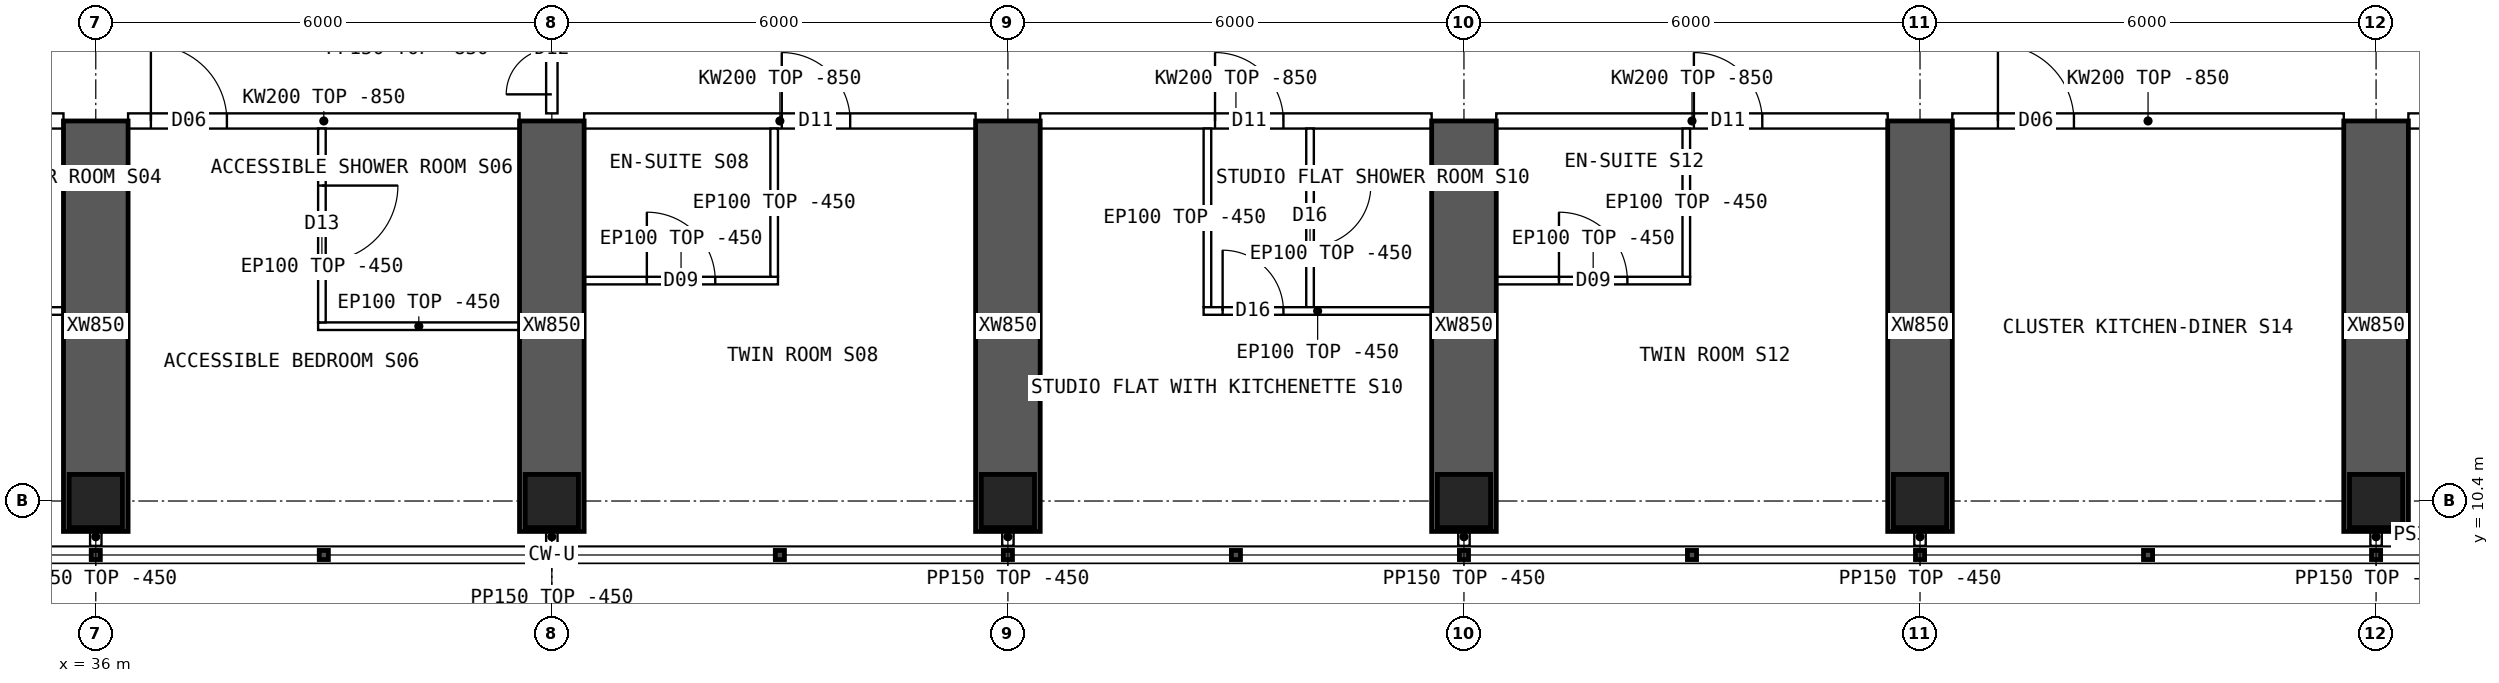
"""IFC4 building model, lengths in metres.
Left out: names, types, materials, properties, quantities, classifications, styles, units other than length and angle.
Written with IfcOpenShell. Run it as: python <this file> out.ifc"""

import sys

from ifc_helpers import new_model, si_unit, direction, frame, frame_2d, origin, origin_2d, place, context, subcontext, project, spatial, polyline, rectangle, hollow_rectangle, outline, extrude, element, fill, save


model = new_model("IFC4")
c1 = context("Model", 3, precision=1e-05, world=origin(), true_north=direction((0.0, 1.0)))
c2 = subcontext(c1, "Body", "Model", "MODEL_VIEW")
j1 = project(units=[si_unit("LENGTHUNIT", "METRE"), si_unit("PLANEANGLEUNIT", "RADIAN")], contexts=[c1])
p1 = place(None, origin())
s1 = spatial("IfcSite", under=j1, at=p1, CompositionType="ELEMENT")
p2 = place(p1, origin())
s2 = spatial("IfcBuilding", under=s1, at=p2, CompositionType="ELEMENT")
p3 = place(p2, frame((0.0, 0.0, 159.85)))
s3 = spatial("IfcBuildingStorey", under=s2, at=p3, CompositionType="ELEMENT", Elevation=159.85)
for number, where, z_axis, x_axis in (
    (1, (36.0, 10.4, 0.0), (0.0, 0.0, 1.0), (1.0, 0.0, 0.0)),
    (2, (42.0, 10.4, 0.0), (0.0, 0.0, 1.0), (1.0, 0.0, 0.0)),
    (3, (48.0, 10.4, 0.0), (0.0, 0.0, 1.0), (1.0, 0.0, 0.0)),
    (4, (54.0, 10.4, 0.0), (0.0, 0.0, 1.0), (1.0, 0.0, 0.0)),
    (5, (60.0, 10.4, 0.0), (0.0, 0.0, 1.0), (1.0, 0.0, 0.0)),
    (6, (66.0, 10.4, 0.0), (0.0, 0.0, 1.0), (1.0, 0.0, 0.0)),
):
    element("IfcColumn", number, at=place(p3, frame(where, z_axis=z_axis, x_axis=x_axis)), inside=s3, PredefinedType="COLUMN", context=c2, shape_type="SweptSolid", body=[
        extrude(hollow_rectangle(XDim=0.7, YDim=0.7, WallThickness=0.07, at=origin_2d()), origin(), (0.0, 0.0, 1.0), 3.75),
    ])
for number, where, z_axis, x_axis in (
    (7, (36.0, 10.0, 0.0), (0.0, 0.0, 1.0), (0.0, 1.0, 0.0)),
    (8, (42.0, 10.0, 0.0), (0.0, 0.0, 1.0), (0.0, 1.0, 0.0)),
    (9, (48.0, 10.0, 0.0), (0.0, 0.0, 1.0), (0.0, 1.0, 0.0)),
    (10, (54.0, 10.0, 0.0), (0.0, 0.0, 1.0), (0.0, 1.0, 0.0)),
    (11, (60.0, 10.0, 0.0), (0.0, 0.0, 1.0), (0.0, 1.0, 0.0)),
    (12, (66.0, 10.0, 0.0), (0.0, 0.0, 1.0), (0.0, 1.0, 0.0)),
):
    element("IfcWall", number, at=place(p3, frame(where, z_axis=z_axis, x_axis=x_axis)), inside=s3, PredefinedType="SHEAR", context=c2, shape_type="SweptSolid", body=[
        extrude(rectangle(XDim=5.4, YDim=0.85, at=frame_2d((2.7, 0.0))), origin(), (0.0, 0.0, 1.0), 3.75),
    ])
p4 = place(p3, frame((66.8, 9.95, 0.0), z_axis=(0.0, 0.0, 1.0), x_axis=(-1.0, 0.0, 0.0)))
e13 = element("IfcWall", 13, at=p4, inside=s3, PredefinedType="SOLIDWALL", context=c2, shape_type="SweptSolid", body=[
    extrude(rectangle(XDim=0.375, YDim=0.3, at=frame_2d((0.188, 0.0))), origin(), (0.0, 0.0, 1.0), 3.3),
])
p5 = place(p3, frame((30.425, 15.4, 0.0), z_axis=(0.0, 0.0, 1.0), x_axis=(1.0, 0.0, 0.0)))
e14 = element("IfcWall", 14, at=p5, inside=s3, PredefinedType="SOLIDWALL", context=c2, shape_type="SweptSolid", body=[
    extrude(outline(polyline([(0.0, 0.0), (5.15, 0.0), (5.15, 2.9), (0.0, 2.9), (0.0, 0.0)])), frame((0.0, 0.1, 0.0), z_axis=(0.0, -1.0, 0.0), x_axis=(1.0, 0.0, 0.0)), (0.0, 0.0, 1.0), 0.2),
])
p6 = place(p5, frame((2.3, 0.0, 0.0)))
e15 = element("IfcOpeningElement", 15, at=p6, cuts=e14, PredefinedType="OPENING", context=c2, shape_type="SweptSolid", body=[
    extrude(rectangle(XDim=0.9, YDim=2.1, at=frame_2d((0.45, 1.05))), frame((0.0, 0.11, 0.0), z_axis=(0.0, -1.0, 0.0), x_axis=(1.0, 0.0, 0.0)), (0.0, 0.0, 1.0), 0.22),
])
p7 = place(p3, frame((36.425, 15.4, 0.0), z_axis=(0.0, 0.0, 1.0), x_axis=(1.0, 0.0, 0.0)))
e16 = element("IfcWall", 16, at=p7, inside=s3, PredefinedType="SOLIDWALL", context=c2, shape_type="SweptSolid", body=[
    extrude(outline(polyline([(0.0, 0.0), (5.15, 0.0), (5.15, 2.9), (0.0, 2.9), (0.0, 0.0)])), frame((0.0, 0.1, 0.0), z_axis=(0.0, -1.0, 0.0), x_axis=(1.0, 0.0, 0.0)), (0.0, 0.0, 1.0), 0.2),
])
p8 = place(p7, frame((0.3, 0.0, 0.0)))
e17 = element("IfcOpeningElement", 17, at=p8, cuts=e16, PredefinedType="OPENING", context=c2, shape_type="SweptSolid", body=[
    extrude(rectangle(XDim=1.0, YDim=2.1, at=frame_2d((0.5, 1.05))), frame((0.0, 0.11, 0.0), z_axis=(0.0, -1.0, 0.0), x_axis=(1.0, 0.0, 0.0)), (0.0, 0.0, 1.0), 0.22),
])
p9 = place(p3, frame((42.425, 15.4, 0.0), z_axis=(0.0, 0.0, 1.0), x_axis=(1.0, 0.0, 0.0)))
e18 = element("IfcWall", 18, at=p9, inside=s3, PredefinedType="SOLIDWALL", context=c2, shape_type="SweptSolid", body=[
    extrude(outline(polyline([(0.0, 0.0), (5.15, 0.0), (5.15, 2.9), (0.0, 2.9), (0.0, 0.0)])), frame((0.0, 0.1, 0.0), z_axis=(0.0, -1.0, 0.0), x_axis=(1.0, 0.0, 0.0)), (0.0, 0.0, 1.0), 0.2),
])
p10 = place(p9, frame((2.6, 0.0, 0.0)))
e19 = element("IfcOpeningElement", 19, at=p10, cuts=e18, PredefinedType="OPENING", context=c2, shape_type="SweptSolid", body=[
    extrude(rectangle(XDim=0.9, YDim=2.1, at=frame_2d((0.45, 1.05))), frame((0.0, 0.11, 0.0), z_axis=(0.0, -1.0, 0.0), x_axis=(1.0, 0.0, 0.0)), (0.0, 0.0, 1.0), 0.22),
])
p11 = place(p3, frame((48.425, 15.4, 0.0), z_axis=(0.0, 0.0, 1.0), x_axis=(1.0, 0.0, 0.0)))
e20 = element("IfcWall", 20, at=p11, inside=s3, PredefinedType="SOLIDWALL", context=c2, shape_type="SweptSolid", body=[
    extrude(outline(polyline([(0.0, 0.0), (5.15, 0.0), (5.15, 2.9), (0.0, 2.9), (0.0, 0.0)])), frame((0.0, 0.1, 0.0), z_axis=(0.0, -1.0, 0.0), x_axis=(1.0, 0.0, 0.0)), (0.0, 0.0, 1.0), 0.2),
])
p12 = place(p11, frame((2.3, 0.0, 0.0)))
e21 = element("IfcOpeningElement", 21, at=p12, cuts=e20, PredefinedType="OPENING", context=c2, shape_type="SweptSolid", body=[
    extrude(rectangle(XDim=0.9, YDim=2.1, at=frame_2d((0.45, 1.05))), frame((0.0, 0.11, 0.0), z_axis=(0.0, -1.0, 0.0), x_axis=(1.0, 0.0, 0.0)), (0.0, 0.0, 1.0), 0.22),
])
p13 = place(p3, frame((54.425, 15.4, 0.0), z_axis=(0.0, 0.0, 1.0), x_axis=(1.0, 0.0, 0.0)))
e22 = element("IfcWall", 22, at=p13, inside=s3, PredefinedType="SOLIDWALL", context=c2, shape_type="SweptSolid", body=[
    extrude(outline(polyline([(0.0, 0.0), (5.15, 0.0), (5.15, 2.9), (0.0, 2.9), (0.0, 0.0)])), frame((0.0, 0.1, 0.0), z_axis=(0.0, -1.0, 0.0), x_axis=(1.0, 0.0, 0.0)), (0.0, 0.0, 1.0), 0.2),
])
p14 = place(p13, frame((2.6, 0.0, 0.0)))
e23 = element("IfcOpeningElement", 23, at=p14, cuts=e22, PredefinedType="OPENING", context=c2, shape_type="SweptSolid", body=[
    extrude(rectangle(XDim=0.9, YDim=2.1, at=frame_2d((0.45, 1.05))), frame((0.0, 0.11, 0.0), z_axis=(0.0, -1.0, 0.0), x_axis=(1.0, 0.0, 0.0)), (0.0, 0.0, 1.0), 0.22),
])
p15 = place(p3, frame((60.425, 15.4, 0.0), z_axis=(0.0, 0.0, 1.0), x_axis=(1.0, 0.0, 0.0)))
e24 = element("IfcWall", 24, at=p15, inside=s3, PredefinedType="SOLIDWALL", context=c2, shape_type="SweptSolid", body=[
    extrude(outline(polyline([(0.0, 0.0), (5.15, 0.0), (5.15, 2.9), (0.0, 2.9), (0.0, 0.0)])), frame((0.0, 0.1, 0.0), z_axis=(0.0, -1.0, 0.0), x_axis=(1.0, 0.0, 0.0)), (0.0, 0.0, 1.0), 0.2),
])
p16 = place(p15, frame((0.6, 0.0, 0.0)))
e25 = element("IfcOpeningElement", 25, at=p16, cuts=e24, PredefinedType="OPENING", context=c2, shape_type="SweptSolid", body=[
    extrude(rectangle(XDim=1.0, YDim=2.1, at=frame_2d((0.5, 1.05))), frame((0.0, 0.11, 0.0), z_axis=(0.0, -1.0, 0.0), x_axis=(1.0, 0.0, 0.0)), (0.0, 0.0, 1.0), 0.22),
])
p17 = place(p3, frame((66.425, 15.4, 0.0), z_axis=(0.0, 0.0, 1.0), x_axis=(1.0, 0.0, 0.0)))
e26 = element("IfcWall", 26, at=p17, inside=s3, PredefinedType="SOLIDWALL", context=c2, shape_type="SweptSolid", body=[
    extrude(rectangle(XDim=1.975, YDim=0.2, at=frame_2d((0.987, 0.0))), origin(), (0.0, 0.0, 1.0), 3.3),
])
p18 = place(p17, frame((0.2, 0.0, 0.0)))
e27 = element("IfcOpeningElement", 27, at=p18, cuts=e26, PredefinedType="OPENING", context=c2, shape_type="SweptSolid", body=[
    extrude(rectangle(XDim=0.9, YDim=2.1, at=frame_2d((0.45, 1.05))), frame((0.0, 0.11, 0.0), z_axis=(0.0, -1.0, 0.0), x_axis=(1.0, 0.0, 0.0)), (0.0, 0.0, 1.0), 0.22),
])
p19 = place(p3, frame((35.575, 12.9, 0.0), z_axis=(0.0, 0.0, 1.0), x_axis=(-1.0, 0.0, 0.0)))
e28 = element("IfcWall", 28, at=p19, inside=s3, PredefinedType="PARTITIONING", context=c2, shape_type="SweptSolid", body=[
    extrude(rectangle(XDim=3.0, YDim=0.1, at=frame_2d((1.5, 0.0))), origin(), (0.0, 0.0, 1.0), 3.3),
])
p20 = place(p19, frame((1.95, 0.0, 0.0)))
e29 = element("IfcOpeningElement", 29, at=p20, cuts=e28, PredefinedType="OPENING", context=c2, shape_type="SweptSolid", body=[
    extrude(rectangle(XDim=0.8, YDim=2.1, at=frame_2d((0.4, 1.05))), frame((0.0, 0.06, 0.0), z_axis=(0.0, -1.0, 0.0), x_axis=(1.0, 0.0, 0.0)), (0.0, 0.0, 1.0), 0.12),
])
p21 = place(p3, frame((38.925, 12.7, 0.0), z_axis=(0.0, 0.0, 1.0), x_axis=(1.0, 0.0, 0.0)))
e30 = element("IfcWall", 30, at=p21, inside=s3, PredefinedType="PARTITIONING", context=c2, shape_type="SweptSolid", body=[
    extrude(rectangle(XDim=2.65, YDim=0.1, at=frame_2d((1.325, 0.0))), origin(), (0.0, 0.0, 1.0), 3.3),
])
p22 = place(p3, frame((38.975, 12.75, 0.0), z_axis=(0.0, 0.0, 1.0), x_axis=(0.0, 1.0, 0.0)))
e31 = element("IfcWall", 31, at=p22, inside=s3, PredefinedType="PARTITIONING", context=c2, shape_type="SweptSolid", body=[
    extrude(outline(polyline([(0.0, 0.0), (2.55, 0.0), (2.55, 2.9), (2.502, 2.9), (2.5, 3.3), (0.0, 3.3), (0.0, 0.0)])), frame((0.0, 0.05, 0.0), z_axis=(0.0, -1.0, 0.0), x_axis=(1.0, 0.0, 0.0)), (0.0, 0.0, 1.0), 0.1),
])
p23 = place(p22, frame((0.8, 0.0, 0.0)))
e32 = element("IfcOpeningElement", 32, at=p23, cuts=e31, PredefinedType="OPENING", context=c2, shape_type="SweptSolid", body=[
    extrude(rectangle(XDim=1.0, YDim=2.1, at=frame_2d((0.5, 1.05))), frame((0.0, 0.06, 0.0), z_axis=(0.0, -1.0, 0.0), x_axis=(1.0, 0.0, 0.0)), (0.0, 0.0, 1.0), 0.12),
])
p24 = place(p3, frame((44.975, 13.3, 0.0), z_axis=(0.0, 0.0, 1.0), x_axis=(-1.0, 0.0, 0.0)))
e33 = element("IfcWall", 33, at=p24, inside=s3, PredefinedType="PARTITIONING", context=c2, shape_type="SweptSolid", body=[
    extrude(rectangle(XDim=2.55, YDim=0.1, at=frame_2d((1.275, 0.0))), origin(), (0.0, 0.0, 1.0), 3.3),
])
p25 = place(p24, frame((0.825, 0.0, 0.0)))
e34 = element("IfcOpeningElement", 34, at=p25, cuts=e33, PredefinedType="OPENING", context=c2, shape_type="SweptSolid", body=[
    extrude(rectangle(XDim=0.9, YDim=2.1, at=frame_2d((0.45, 1.05))), frame((0.0, 0.06, 0.0), z_axis=(0.0, -1.0, 0.0), x_axis=(1.0, 0.0, 0.0)), (0.0, 0.0, 1.0), 0.12),
])
p26 = place(p3, frame((44.925, 13.35, 0.0), z_axis=(0.0, 0.0, 1.0), x_axis=(0.0, 1.0, 0.0)))
e35 = element("IfcWall", 35, at=p26, inside=s3, PredefinedType="PARTITIONING", context=c2, shape_type="SweptSolid", body=[
    extrude(outline(polyline([(0.0, 0.0), (1.95, 0.0), (1.95, 2.9), (1.902, 2.9), (1.9, 3.3), (0.0, 3.3), (0.0, 0.0)])), frame((0.0, 0.05, 0.0), z_axis=(0.0, -1.0, 0.0), x_axis=(1.0, 0.0, 0.0)), (0.0, 0.0, 1.0), 0.1),
])
p27 = place(p3, frame((53.575, 12.9, 0.0), z_axis=(0.0, 0.0, 1.0), x_axis=(-1.0, 0.0, 0.0)))
e36 = element("IfcWall", 36, at=p27, inside=s3, PredefinedType="PARTITIONING", context=c2, shape_type="SweptSolid", body=[
    extrude(rectangle(XDim=3.0, YDim=0.1, at=frame_2d((1.5, 0.0))), origin(), (0.0, 0.0, 1.0), 3.3),
])
p28 = place(p27, frame((1.95, 0.0, 0.0)))
e37 = element("IfcOpeningElement", 37, at=p28, cuts=e36, PredefinedType="OPENING", context=c2, shape_type="SweptSolid", body=[
    extrude(rectangle(XDim=0.8, YDim=2.1, at=frame_2d((0.4, 1.05))), frame((0.0, 0.06, 0.0), z_axis=(0.0, -1.0, 0.0), x_axis=(1.0, 0.0, 0.0)), (0.0, 0.0, 1.0), 0.12),
])
p29 = place(p3, frame((50.625, 12.95, 0.0), z_axis=(0.0, 0.0, 1.0), x_axis=(0.0, 1.0, 0.0)))
e38 = element("IfcWall", 38, at=p29, inside=s3, PredefinedType="PARTITIONING", context=c2, shape_type="SweptSolid", body=[
    extrude(outline(polyline([(0.0, 0.0), (2.35, 0.0), (2.35, 2.9), (2.302, 2.9), (2.3, 3.3), (0.0, 3.3), (0.0, 0.0)])), frame((0.0, 0.05, 0.0), z_axis=(0.0, -1.0, 0.0), x_axis=(1.0, 0.0, 0.0)), (0.0, 0.0, 1.0), 0.1),
])
p30 = place(p3, frame((51.975, 12.95, 0.0), z_axis=(0.0, 0.0, 1.0), x_axis=(0.0, 1.0, 0.0)))
e39 = element("IfcWall", 39, at=p30, inside=s3, PredefinedType="PARTITIONING", context=c2, shape_type="SweptSolid", body=[
    extrude(outline(polyline([(0.0, 0.0), (2.35, 0.0), (2.35, 2.9), (2.302, 2.9), (2.3, 3.3), (0.0, 3.3), (0.0, 0.0)])), frame((0.0, 0.05, 0.0), z_axis=(0.0, -1.0, 0.0), x_axis=(1.0, 0.0, 0.0)), (0.0, 0.0, 1.0), 0.1),
])
p31 = place(p30, frame((0.8, 0.0, 0.0)))
e40 = element("IfcOpeningElement", 40, at=p31, cuts=e39, PredefinedType="OPENING", context=c2, shape_type="SweptSolid", body=[
    extrude(rectangle(XDim=0.8, YDim=2.1, at=frame_2d((0.4, 1.05))), frame((0.0, 0.06, 0.0), z_axis=(0.0, -1.0, 0.0), x_axis=(1.0, 0.0, 0.0)), (0.0, 0.0, 1.0), 0.12),
])
p32 = place(p3, frame((56.975, 13.3, 0.0), z_axis=(0.0, 0.0, 1.0), x_axis=(-1.0, 0.0, 0.0)))
e41 = element("IfcWall", 41, at=p32, inside=s3, PredefinedType="PARTITIONING", context=c2, shape_type="SweptSolid", body=[
    extrude(rectangle(XDim=2.55, YDim=0.1, at=frame_2d((1.275, 0.0))), origin(), (0.0, 0.0, 1.0), 3.3),
])
p33 = place(p32, frame((0.825, 0.0, 0.0)))
e42 = element("IfcOpeningElement", 42, at=p33, cuts=e41, PredefinedType="OPENING", context=c2, shape_type="SweptSolid", body=[
    extrude(rectangle(XDim=0.9, YDim=2.1, at=frame_2d((0.45, 1.05))), frame((0.0, 0.06, 0.0), z_axis=(0.0, -1.0, 0.0), x_axis=(1.0, 0.0, 0.0)), (0.0, 0.0, 1.0), 0.12),
])
p34 = place(p3, frame((56.925, 13.35, 0.0), z_axis=(0.0, 0.0, 1.0), x_axis=(0.0, 1.0, 0.0)))
e43 = element("IfcWall", 43, at=p34, inside=s3, PredefinedType="PARTITIONING", context=c2, shape_type="SweptSolid", body=[
    extrude(outline(polyline([(0.0, 0.0), (1.95, 0.0), (1.95, 2.9), (1.902, 2.9), (1.9, 3.3), (0.0, 3.3), (0.0, 0.0)])), frame((0.0, 0.05, 0.0), z_axis=(0.0, -1.0, 0.0), x_axis=(1.0, 0.0, 0.0)), (0.0, 0.0, 1.0), 0.1),
])
p35 = place(p3, frame((42.0, 15.5, 0.0), z_axis=(0.0, 0.0, 1.0), x_axis=(0.0, 1.0, 0.0)))
e44 = element("IfcWall", 44, at=p35, inside=s3, PredefinedType="PARTITIONING", context=c2, shape_type="SweptSolid", body=[
    extrude(outline(polyline([(0.0, 0.0), (1.7, 0.0), (1.7, 2.9), (0.0, 2.9), (0.0, 0.0)])), frame((0.0, 0.075, 0.0), z_axis=(0.0, -1.0, 0.0), x_axis=(1.0, 0.0, 0.0)), (0.0, 0.0, 1.0), 0.15),
])
p36 = place(p35, frame((0.25, 0.0, 0.0)))
e45 = element("IfcOpeningElement", 45, at=p36, cuts=e44, PredefinedType="OPENING", context=c2, shape_type="SweptSolid", body=[
    extrude(rectangle(XDim=1.2, YDim=2.1, at=frame_2d((0.6, 1.05))), frame((0.0, 0.085, 0.0), z_axis=(0.0, -1.0, 0.0), x_axis=(1.0, 0.0, 0.0)), (0.0, 0.0, 1.0), 0.17),
])
for number, where, z_axis, x_axis in (
    (46, (36.0, 10.05, 0.0), (0.0, 0.0, 1.0), (0.0, -1.0, 0.0)),
    (47, (42.0, 10.05, 0.0), (0.0, 0.0, 1.0), (0.0, -1.0, 0.0)),
    (48, (48.0, 10.05, 0.0), (0.0, 0.0, 1.0), (0.0, -1.0, 0.0)),
    (49, (54.0, 10.05, 0.0), (0.0, 0.0, 1.0), (0.0, -1.0, 0.0)),
    (50, (60.0, 10.05, 0.0), (0.0, 0.0, 1.0), (0.0, -1.0, 0.0)),
    (51, (66.0, 10.05, 0.0), (0.0, 0.0, 1.0), (0.0, -1.0, 0.0)),
):
    element("IfcWall", number, at=place(p3, frame(where, z_axis=z_axis, x_axis=x_axis)), inside=s3, PredefinedType="PARTITIONING", context=c2, shape_type="SweptSolid", body=[
        extrude(rectangle(XDim=0.24, YDim=0.15, at=frame_2d((0.12, 0.0))), origin(), (0.0, 0.0, 1.0), 3.3),
    ])
p37 = place(p23, origin())
e52 = element("IfcDoor", 52, at=p37, inside=s3, OperationType="SINGLE_SWING_RIGHT", PredefinedType="DOOR", context=c2, shape_type="SweptSolid", body=[
    extrude(rectangle(XDim=1.0, YDim=2.1, at=frame_2d((0.5, 1.05))), frame((0.0, 0.025, 0.0), z_axis=(0.0, -1.0, 0.0), x_axis=(1.0, 0.0, 0.0)), (0.0, 0.0, 1.0), 0.05),
])
fill(e32, e52)
p38 = place(p8, origin())
e53 = element("IfcDoor", 53, at=p38, inside=s3, OperationType="SINGLE_SWING_LEFT", PredefinedType="DOOR", context=c2, shape_type="SweptSolid", body=[
    extrude(rectangle(XDim=1.0, YDim=2.1, at=frame_2d((0.5, 1.05))), frame((0.0, 0.025, 0.0), z_axis=(0.0, -1.0, 0.0), x_axis=(1.0, 0.0, 0.0)), (0.0, 0.0, 1.0), 0.05),
])
fill(e17, e53)
p39 = place(p25, origin())
e54 = element("IfcDoor", 54, at=p39, inside=s3, OperationType="SINGLE_SWING_RIGHT", PredefinedType="DOOR", context=c2, shape_type="SweptSolid", body=[
    extrude(rectangle(XDim=0.9, YDim=2.1, at=frame_2d((0.45, 1.05))), frame((0.0, 0.025, 0.0), z_axis=(0.0, -1.0, 0.0), x_axis=(1.0, 0.0, 0.0)), (0.0, 0.0, 1.0), 0.05),
])
fill(e34, e54)
p40 = place(p10, origin())
e55 = element("IfcDoor", 55, at=p40, inside=s3, OperationType="SINGLE_SWING_LEFT", PredefinedType="DOOR", context=c2, shape_type="SweptSolid", body=[
    extrude(rectangle(XDim=0.9, YDim=2.1, at=frame_2d((0.45, 1.05))), frame((0.0, 0.025, 0.0), z_axis=(0.0, -1.0, 0.0), x_axis=(1.0, 0.0, 0.0)), (0.0, 0.0, 1.0), 0.05),
])
fill(e19, e55)
p41 = place(p28, origin())
e56 = element("IfcDoor", 56, at=p41, inside=s3, OperationType="SINGLE_SWING_RIGHT", PredefinedType="DOOR", context=c2, shape_type="SweptSolid", body=[
    extrude(rectangle(XDim=0.8, YDim=2.1, at=frame_2d((0.4, 1.05))), frame((0.0, 0.025, 0.0), z_axis=(0.0, -1.0, 0.0), x_axis=(1.0, 0.0, 0.0)), (0.0, 0.0, 1.0), 0.05),
])
fill(e37, e56)
p42 = place(p31, origin())
e57 = element("IfcDoor", 57, at=p42, inside=s3, OperationType="SINGLE_SWING_RIGHT", PredefinedType="DOOR", context=c2, shape_type="SweptSolid", body=[
    extrude(rectangle(XDim=0.8, YDim=2.1, at=frame_2d((0.4, 1.05))), frame((0.0, 0.025, 0.0), z_axis=(0.0, -1.0, 0.0), x_axis=(1.0, 0.0, 0.0)), (0.0, 0.0, 1.0), 0.05),
])
fill(e40, e57)
p43 = place(p12, origin())
e58 = element("IfcDoor", 58, at=p43, inside=s3, OperationType="SINGLE_SWING_LEFT", PredefinedType="DOOR", context=c2, shape_type="SweptSolid", body=[
    extrude(rectangle(XDim=0.9, YDim=2.1, at=frame_2d((0.45, 1.05))), frame((0.0, 0.025, 0.0), z_axis=(0.0, -1.0, 0.0), x_axis=(1.0, 0.0, 0.0)), (0.0, 0.0, 1.0), 0.05),
])
fill(e21, e58)
p44 = place(p33, origin())
e59 = element("IfcDoor", 59, at=p44, inside=s3, OperationType="SINGLE_SWING_RIGHT", PredefinedType="DOOR", context=c2, shape_type="SweptSolid", body=[
    extrude(rectangle(XDim=0.9, YDim=2.1, at=frame_2d((0.45, 1.05))), frame((0.0, 0.025, 0.0), z_axis=(0.0, -1.0, 0.0), x_axis=(1.0, 0.0, 0.0)), (0.0, 0.0, 1.0), 0.05),
])
fill(e42, e59)
p45 = place(p14, origin())
e60 = element("IfcDoor", 60, at=p45, inside=s3, OperationType="SINGLE_SWING_LEFT", PredefinedType="DOOR", context=c2, shape_type="SweptSolid", body=[
    extrude(rectangle(XDim=0.9, YDim=2.1, at=frame_2d((0.45, 1.05))), frame((0.0, 0.025, 0.0), z_axis=(0.0, -1.0, 0.0), x_axis=(1.0, 0.0, 0.0)), (0.0, 0.0, 1.0), 0.05),
])
fill(e23, e60)
p46 = place(p16, origin())
e61 = element("IfcDoor", 61, at=p46, inside=s3, OperationType="SINGLE_SWING_LEFT", PredefinedType="DOOR", context=c2, shape_type="SweptSolid", body=[
    extrude(rectangle(XDim=1.0, YDim=2.1, at=frame_2d((0.5, 1.05))), frame((0.0, 0.025, 0.0), z_axis=(0.0, -1.0, 0.0), x_axis=(1.0, 0.0, 0.0)), (0.0, 0.0, 1.0), 0.05),
])
fill(e25, e61)
p47 = place(p36, origin())
e62 = element("IfcDoor", 62, at=p47, inside=s3, OperationType="DOUBLE_DOOR_SINGLE_SWING", PredefinedType="DOOR", context=c2, shape_type="SweptSolid", body=[
    extrude(rectangle(XDim=1.2, YDim=2.1, at=frame_2d((0.6, 1.05))), frame((0.0, 0.025, 0.0), z_axis=(0.0, -1.0, 0.0), x_axis=(1.0, 0.0, 0.0)), (0.0, 0.0, 1.0), 0.05),
])
fill(e45, e62)
save(model, sys.argv[1])
